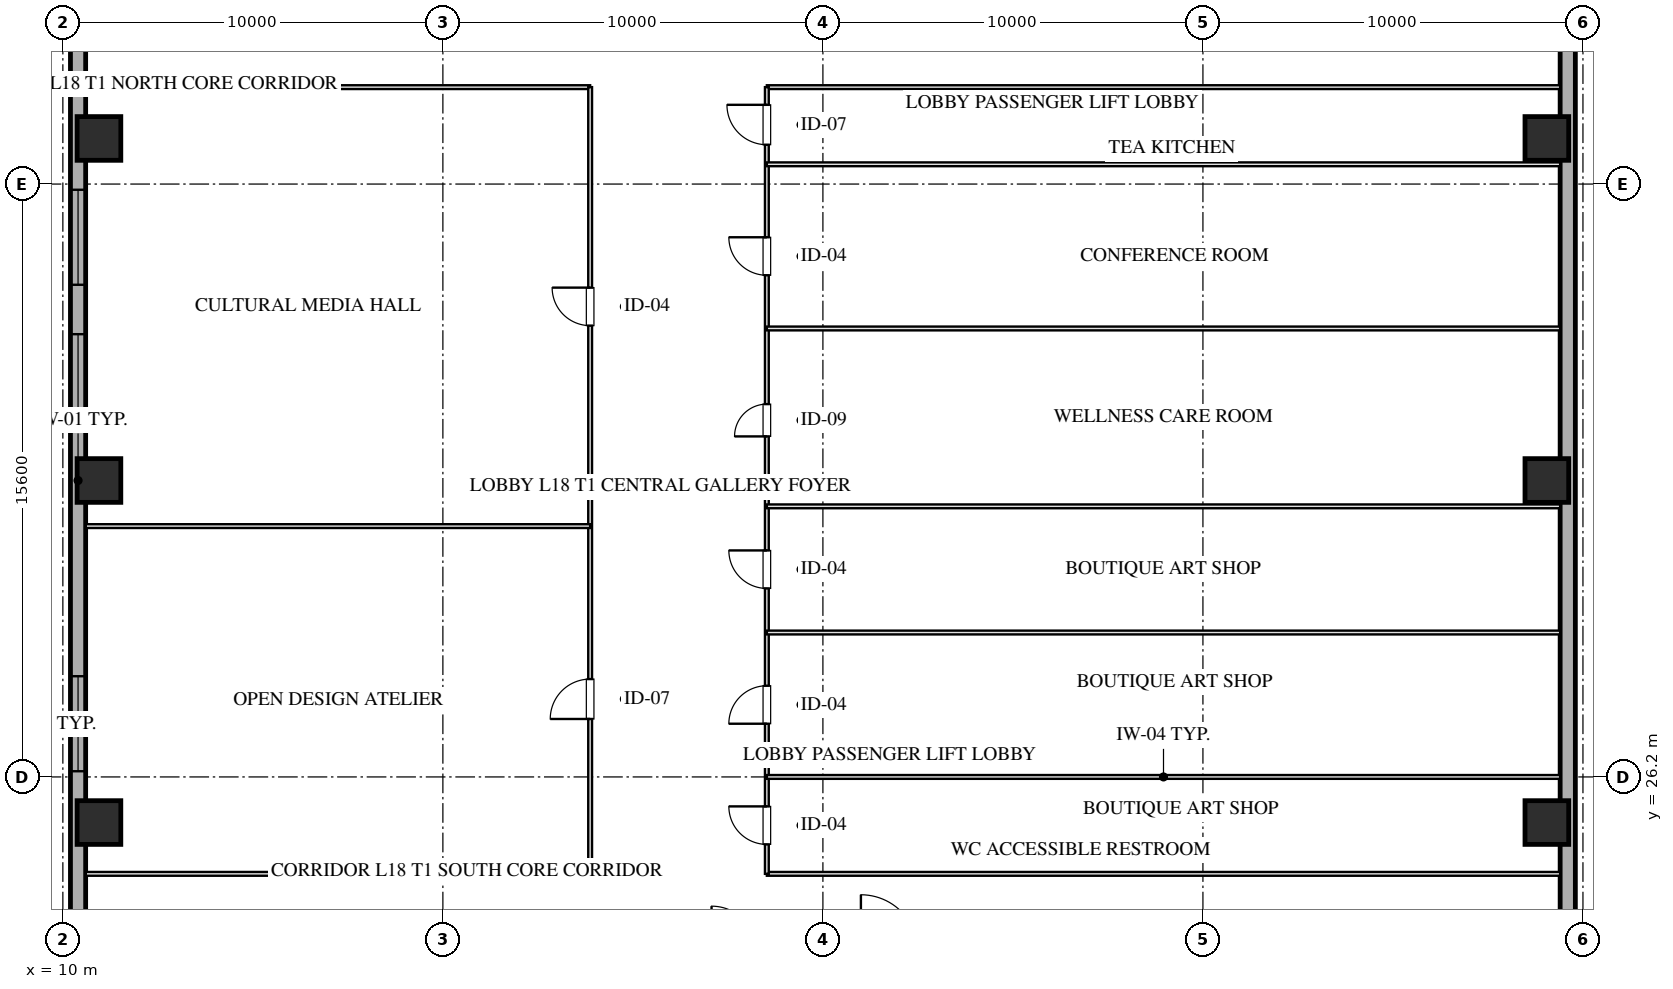
"""IFC4 building model, lengths in metres.
Left out: names, types, materials, properties, quantities, classifications, styles, units other than length and angle.
Written with IfcOpenShell. Run it as: python <this file> out.ifc"""

import sys

from ifc_helpers import new_model, si_unit, direction, frame, frame_2d, origin, origin_2d, place, context, subcontext, project, spatial, rectangle, hollow_rectangle, extrude, element, fill, save


model = new_model("IFC4")
c1 = context("Model", 3, precision=1e-05, world=origin(), true_north=direction((0.0, 1.0)))
c2 = subcontext(c1, "Body", "Model", "MODEL_VIEW")
j1 = project(units=[si_unit("LENGTHUNIT", "METRE"), si_unit("PLANEANGLEUNIT", "RADIAN")], contexts=[c1])
p1 = place(None, origin())
s1 = spatial("IfcSite", under=j1, at=p1, CompositionType="ELEMENT")
p2 = place(p1, origin())
s2 = spatial("IfcBuilding", under=s1, at=p2, CompositionType="ELEMENT")
p3 = place(p2, frame((0.0, 0.0, 74.75)))
s3 = spatial("IfcBuildingStorey", under=s2, at=p3, CompositionType="ELEMENT", Elevation=74.75)
for number, where, z_axis, x_axis in (
    (1, (10.95, 25.0, 0.0), (0.0, 0.0, 1.0), (1.0, 0.0, 0.0)),
    (2, (10.95, 34.0, 0.0), (0.0, 0.0, 1.0), (1.0, 0.0, 0.0)),
    (3, (10.95, 43.0, 0.0), (0.0, 0.0, 1.0), (1.0, 0.0, 0.0)),
    (4, (49.05, 25.0, 0.0), (0.0, 0.0, 1.0), (1.0, 0.0, 0.0)),
    (5, (49.05, 34.0, 0.0), (0.0, 0.0, 1.0), (1.0, 0.0, 0.0)),
    (6, (49.05, 43.0, 0.0), (0.0, 0.0, 1.0), (1.0, 0.0, 0.0)),
):
    element("IfcColumn", number, at=place(p3, frame(where, z_axis=z_axis, x_axis=x_axis)), inside=s3, PredefinedType="COLUMN", context=c2, shape_type="SweptSolid", body=[
        extrude(hollow_rectangle(XDim=1.15, YDim=1.15, WallThickness=0.04, at=origin_2d()), origin(), (0.0, 0.0, 1.0), 3.451),
    ])
p4 = place(p3, frame((10.4, 7.2, 0.0), z_axis=(0.0, 0.0, 1.0), x_axis=(0.0, 1.0, 0.0)))
e7 = element("IfcWall", 7, at=p4, inside=s3, PredefinedType="SOLIDWALL", context=c2, shape_type="SweptSolid", body=[
    extrude(rectangle(XDim=53.6, YDim=0.4, at=frame_2d((26.8, 0.0))), origin(), (0.0, 0.0, 1.0), 2.61),
])
p5 = place(p4, frame((19.15, 0.0, 0.75)))
e8 = element("IfcOpeningElement", 8, at=p5, cuts=e7, PredefinedType="OPENING", context=c2, shape_type="SweptSolid", body=[
    extrude(rectangle(XDim=2.5, YDim=1.46, at=frame_2d((1.25, 0.73))), frame((0.0, 0.21, 0.0), z_axis=(0.0, -1.0, 0.0), x_axis=(1.0, 0.0, 0.0)), (0.0, 0.0, 1.0), 0.42),
])
p6 = place(p4, frame((28.15, 0.0, 0.75)))
e9 = element("IfcOpeningElement", 9, at=p6, cuts=e7, PredefinedType="OPENING", context=c2, shape_type="SweptSolid", body=[
    extrude(rectangle(XDim=2.5, YDim=1.46, at=frame_2d((1.25, 0.73))), frame((0.0, 0.21, 0.0), z_axis=(0.0, -1.0, 0.0), x_axis=(1.0, 0.0, 0.0)), (0.0, 0.0, 1.0), 0.42),
])
p7 = place(p4, frame((31.95, 0.0, 0.75)))
e10 = element("IfcOpeningElement", 10, at=p7, cuts=e7, PredefinedType="OPENING", context=c2, shape_type="SweptSolid", body=[
    extrude(rectangle(XDim=2.5, YDim=1.46, at=frame_2d((1.25, 0.73))), frame((0.0, 0.21, 0.0), z_axis=(0.0, -1.0, 0.0), x_axis=(1.0, 0.0, 0.0)), (0.0, 0.0, 1.0), 0.42),
])
p8 = place(p3, frame((49.6, 60.8, 0.0), z_axis=(0.0, 0.0, 1.0), x_axis=(0.0, -1.0, 0.0)))
e11 = element("IfcWall", 11, at=p8, inside=s3, PredefinedType="SOLIDWALL", context=c2, shape_type="SweptSolid", body=[
    extrude(rectangle(XDim=53.6, YDim=0.4, at=frame_2d((26.8, 0.0))), origin(), (0.0, 0.0, 1.0), 2.61),
])
p9 = place(p3, frame((10.6, 23.65, 0.0), z_axis=(0.0, 0.0, 1.0), x_axis=(1.0, 0.0, 0.0)))
e12 = element("IfcWall", 12, at=p9, inside=s3, PredefinedType="MOVABLE", context=c2, shape_type="SweptSolid", body=[
    extrude(rectangle(XDim=13.275, YDim=0.1, at=frame_2d((6.637, 0.0))), origin(), (0.0, 0.0, 1.0), 3.175),
])
p10 = place(p3, frame((28.525, 23.65, 0.0), z_axis=(0.0, 0.0, 1.0), x_axis=(1.0, 0.0, 0.0)))
e13 = element("IfcWall", 13, at=p10, inside=s3, PredefinedType="MOVABLE", context=c2, shape_type="SweptSolid", body=[
    extrude(rectangle(XDim=20.875, YDim=0.1, at=frame_2d((10.438, 0.0))), origin(), (0.0, 0.0, 1.0), 3.175),
])
p11 = place(p3, frame((10.6, 44.35, 0.0), z_axis=(0.0, 0.0, 1.0), x_axis=(1.0, 0.0, 0.0)))
e14 = element("IfcWall", 14, at=p11, inside=s3, PredefinedType="MOVABLE", context=c2, shape_type="SweptSolid", body=[
    extrude(rectangle(XDim=13.275, YDim=0.1, at=frame_2d((6.637, 0.0))), origin(), (0.0, 0.0, 1.0), 3.175),
])
p12 = place(p3, frame((28.525, 44.35, 0.0), z_axis=(0.0, 0.0, 1.0), x_axis=(1.0, 0.0, 0.0)))
e15 = element("IfcWall", 15, at=p12, inside=s3, PredefinedType="MOVABLE", context=c2, shape_type="SweptSolid", body=[
    extrude(rectangle(XDim=20.875, YDim=0.1, at=frame_2d((10.438, 0.0))), origin(), (0.0, 0.0, 1.0), 3.175),
])
p13 = place(p3, frame((23.875, 23.65, 0.0), z_axis=(0.0, 0.0, 1.0), x_axis=(0.0, 1.0, 0.0)))
e16 = element("IfcWall", 16, at=p13, inside=s3, PredefinedType="MOVABLE", context=c2, shape_type="SweptSolid", body=[
    extrude(rectangle(XDim=20.7, YDim=0.1, at=frame_2d((10.35, 0.0))), origin(), (0.0, 0.0, 1.0), 3.175),
])
p14 = place(p13, frame((4.075, 0.0, 0.0)))
e17 = element("IfcOpeningElement", 17, at=p14, cuts=e16, PredefinedType="OPENING", context=c2, shape_type="SweptSolid", body=[
    extrude(rectangle(XDim=1.05, YDim=2.05, at=frame_2d((0.525, 1.025))), frame((0.0, 0.06, 0.0), z_axis=(0.0, -1.0, 0.0), x_axis=(1.0, 0.0, 0.0)), (0.0, 0.0, 1.0), 0.12),
])
p15 = place(p13, frame((14.425, 0.0, 0.0)))
e18 = element("IfcOpeningElement", 18, at=p15, cuts=e16, PredefinedType="OPENING", context=c2, shape_type="SweptSolid", body=[
    extrude(rectangle(XDim=1.0, YDim=2.05, at=frame_2d((0.5, 1.025))), frame((0.0, 0.06, 0.0), z_axis=(0.0, -1.0, 0.0), x_axis=(1.0, 0.0, 0.0)), (0.0, 0.0, 1.0), 0.12),
])
p16 = place(p3, frame((28.525, 23.65, 0.0), z_axis=(0.0, 0.0, 1.0), x_axis=(0.0, 1.0, 0.0)))
e19 = element("IfcWall", 19, at=p16, inside=s3, PredefinedType="MOVABLE", context=c2, shape_type="SweptSolid", body=[
    extrude(rectangle(XDim=20.7, YDim=0.1, at=frame_2d((10.35, 0.0))), origin(), (0.0, 0.0, 1.0), 3.175),
])
p17 = place(p16, frame((0.775, 0.0, 0.0)))
e20 = element("IfcOpeningElement", 20, at=p17, cuts=e19, PredefinedType="OPENING", context=c2, shape_type="SweptSolid", body=[
    extrude(rectangle(XDim=1.0, YDim=2.05, at=frame_2d((0.5, 1.025))), frame((0.0, 0.06, 0.0), z_axis=(0.0, -1.0, 0.0), x_axis=(1.0, 0.0, 0.0)), (0.0, 0.0, 1.0), 0.12),
])
p18 = place(p16, frame((3.95, 0.0, 0.0)))
e21 = element("IfcOpeningElement", 21, at=p18, cuts=e19, PredefinedType="OPENING", context=c2, shape_type="SweptSolid", body=[
    extrude(rectangle(XDim=1.0, YDim=2.05, at=frame_2d((0.5, 1.025))), frame((0.0, 0.06, 0.0), z_axis=(0.0, -1.0, 0.0), x_axis=(1.0, 0.0, 0.0)), (0.0, 0.0, 1.0), 0.12),
])
p19 = place(p16, frame((7.51, 0.0, 0.0)))
e22 = element("IfcOpeningElement", 22, at=p19, cuts=e19, PredefinedType="OPENING", context=c2, shape_type="SweptSolid", body=[
    extrude(rectangle(XDim=1.0, YDim=2.05, at=frame_2d((0.5, 1.025))), frame((0.0, 0.06, 0.0), z_axis=(0.0, -1.0, 0.0), x_axis=(1.0, 0.0, 0.0)), (0.0, 0.0, 1.0), 0.12),
])
p20 = place(p16, frame((11.51, 0.0, 0.0)))
e23 = element("IfcOpeningElement", 23, at=p20, cuts=e19, PredefinedType="OPENING", context=c2, shape_type="SweptSolid", body=[
    extrude(rectangle(XDim=0.85, YDim=2.05, at=frame_2d((0.425, 1.025))), frame((0.0, 0.06, 0.0), z_axis=(0.0, -1.0, 0.0), x_axis=(1.0, 0.0, 0.0)), (0.0, 0.0, 1.0), 0.12),
])
p21 = place(p16, frame((15.75, 0.0, 0.0)))
e24 = element("IfcOpeningElement", 24, at=p21, cuts=e19, PredefinedType="OPENING", context=c2, shape_type="SweptSolid", body=[
    extrude(rectangle(XDim=1.0, YDim=2.05, at=frame_2d((0.5, 1.025))), frame((0.0, 0.06, 0.0), z_axis=(0.0, -1.0, 0.0), x_axis=(1.0, 0.0, 0.0)), (0.0, 0.0, 1.0), 0.12),
])
p22 = place(p16, frame((19.185, 0.0, 0.0)))
e25 = element("IfcOpeningElement", 25, at=p22, cuts=e19, PredefinedType="OPENING", context=c2, shape_type="SweptSolid", body=[
    extrude(rectangle(XDim=1.05, YDim=2.05, at=frame_2d((0.525, 1.025))), frame((0.0, 0.06, 0.0), z_axis=(0.0, -1.0, 0.0), x_axis=(1.0, 0.0, 0.0)), (0.0, 0.0, 1.0), 0.12),
])
p23 = place(p3, frame((10.6, 32.8, 0.0), z_axis=(0.0, 0.0, 1.0), x_axis=(1.0, 0.0, 0.0)))
e26 = element("IfcWall", 26, at=p23, inside=s3, PredefinedType="MOVABLE", context=c2, shape_type="SweptSolid", body=[
    extrude(rectangle(XDim=13.275, YDim=0.1, at=frame_2d((6.637, 0.0))), origin(), (0.0, 0.0, 1.0), 3.175),
])
for number, where, z_axis, x_axis in (
    (27, (28.525, 26.2, 0.0), (0.0, 0.0, 1.0), (1.0, 0.0, 0.0)),
    (28, (28.525, 30.0, 0.0), (0.0, 0.0, 1.0), (1.0, 0.0, 0.0)),
    (29, (28.525, 33.32, 0.0), (0.0, 0.0, 1.0), (1.0, 0.0, 0.0)),
    (30, (28.525, 38.0, 0.0), (0.0, 0.0, 1.0), (1.0, 0.0, 0.0)),
    (31, (28.525, 42.32, 0.0), (0.0, 0.0, 1.0), (1.0, 0.0, 0.0)),
):
    element("IfcWall", number, at=place(p3, frame(where, z_axis=z_axis, x_axis=x_axis)), inside=s3, PredefinedType="MOVABLE", context=c2, shape_type="SweptSolid", body=[
        extrude(rectangle(XDim=20.875, YDim=0.1, at=frame_2d((10.438, 0.0))), origin(), (0.0, 0.0, 1.0), 3.175),
    ])
p24 = place(p5, origin())
e32 = element("IfcWindow", 32, at=p24, inside=s3, PartitioningType="TRIPLE_PANEL_VERTICAL", PredefinedType="WINDOW", context=c2, shape_type="SweptSolid", body=[
    extrude(rectangle(XDim=2.5, YDim=1.46, at=frame_2d((1.25, 0.73))), frame((0.0, 0.03, 0.0), z_axis=(0.0, -1.0, 0.0), x_axis=(1.0, 0.0, 0.0)), (0.0, 0.0, 1.0), 0.06),
])
fill(e8, e32)
p25 = place(p6, origin())
e33 = element("IfcWindow", 33, at=p25, inside=s3, PartitioningType="TRIPLE_PANEL_VERTICAL", PredefinedType="WINDOW", context=c2, shape_type="SweptSolid", body=[
    extrude(rectangle(XDim=2.5, YDim=1.46, at=frame_2d((1.25, 0.73))), frame((0.0, 0.03, 0.0), z_axis=(0.0, -1.0, 0.0), x_axis=(1.0, 0.0, 0.0)), (0.0, 0.0, 1.0), 0.06),
])
fill(e9, e33)
p26 = place(p7, origin())
e34 = element("IfcWindow", 34, at=p26, inside=s3, PartitioningType="TRIPLE_PANEL_VERTICAL", PredefinedType="WINDOW", context=c2, shape_type="SweptSolid", body=[
    extrude(rectangle(XDim=2.5, YDim=1.46, at=frame_2d((1.25, 0.73))), frame((0.0, 0.03, 0.0), z_axis=(0.0, -1.0, 0.0), x_axis=(1.0, 0.0, 0.0)), (0.0, 0.0, 1.0), 0.06),
])
fill(e10, e34)
p27 = place(p14, origin())
e35 = element("IfcDoor", 35, at=p27, inside=s3, OperationType="SINGLE_SWING_LEFT", PredefinedType="DOOR", context=c2, shape_type="SweptSolid", body=[
    extrude(rectangle(XDim=1.05, YDim=2.05, at=frame_2d((0.525, 1.025))), frame((0.0, 0.025, 0.0), z_axis=(0.0, -1.0, 0.0), x_axis=(1.0, 0.0, 0.0)), (0.0, 0.0, 1.0), 0.05),
])
fill(e17, e35)
p28 = place(p15, origin())
e36 = element("IfcDoor", 36, at=p28, inside=s3, OperationType="SINGLE_SWING_RIGHT", PredefinedType="DOOR", context=c2, shape_type="SweptSolid", body=[
    extrude(rectangle(XDim=1.0, YDim=2.05, at=frame_2d((0.5, 1.025))), frame((0.0, 0.025, 0.0), z_axis=(0.0, -1.0, 0.0), x_axis=(1.0, 0.0, 0.0)), (0.0, 0.0, 1.0), 0.05),
])
fill(e18, e36)
p29 = place(p17, origin())
e37 = element("IfcDoor", 37, at=p29, inside=s3, OperationType="SINGLE_SWING_RIGHT", PredefinedType="DOOR", context=c2, shape_type="SweptSolid", body=[
    extrude(rectangle(XDim=1.0, YDim=2.05, at=frame_2d((0.5, 1.025))), frame((0.0, 0.025, 0.0), z_axis=(0.0, -1.0, 0.0), x_axis=(1.0, 0.0, 0.0)), (0.0, 0.0, 1.0), 0.05),
])
fill(e20, e37)
p30 = place(p18, origin())
e38 = element("IfcDoor", 38, at=p30, inside=s3, OperationType="SINGLE_SWING_LEFT", PredefinedType="DOOR", context=c2, shape_type="SweptSolid", body=[
    extrude(rectangle(XDim=1.0, YDim=2.05, at=frame_2d((0.5, 1.025))), frame((0.0, 0.025, 0.0), z_axis=(0.0, -1.0, 0.0), x_axis=(1.0, 0.0, 0.0)), (0.0, 0.0, 1.0), 0.05),
])
fill(e21, e38)
p31 = place(p19, origin())
e39 = element("IfcDoor", 39, at=p31, inside=s3, OperationType="SINGLE_SWING_RIGHT", PredefinedType="DOOR", context=c2, shape_type="SweptSolid", body=[
    extrude(rectangle(XDim=1.0, YDim=2.05, at=frame_2d((0.5, 1.025))), frame((0.0, 0.025, 0.0), z_axis=(0.0, -1.0, 0.0), x_axis=(1.0, 0.0, 0.0)), (0.0, 0.0, 1.0), 0.05),
])
fill(e22, e39)
p32 = place(p20, origin())
e40 = element("IfcDoor", 40, at=p32, inside=s3, OperationType="SINGLE_SWING_LEFT", PredefinedType="DOOR", context=c2, shape_type="SweptSolid", body=[
    extrude(rectangle(XDim=0.85, YDim=2.05, at=frame_2d((0.425, 1.025))), frame((0.0, 0.025, 0.0), z_axis=(0.0, -1.0, 0.0), x_axis=(1.0, 0.0, 0.0)), (0.0, 0.0, 1.0), 0.05),
])
fill(e23, e40)
p33 = place(p21, origin())
e41 = element("IfcDoor", 41, at=p33, inside=s3, OperationType="SINGLE_SWING_RIGHT", PredefinedType="DOOR", context=c2, shape_type="SweptSolid", body=[
    extrude(rectangle(XDim=1.0, YDim=2.05, at=frame_2d((0.5, 1.025))), frame((0.0, 0.025, 0.0), z_axis=(0.0, -1.0, 0.0), x_axis=(1.0, 0.0, 0.0)), (0.0, 0.0, 1.0), 0.05),
])
fill(e24, e41)
p34 = place(p22, origin())
e42 = element("IfcDoor", 42, at=p34, inside=s3, OperationType="SINGLE_SWING_RIGHT", PredefinedType="DOOR", context=c2, shape_type="SweptSolid", body=[
    extrude(rectangle(XDim=1.05, YDim=2.05, at=frame_2d((0.525, 1.025))), frame((0.0, 0.025, 0.0), z_axis=(0.0, -1.0, 0.0), x_axis=(1.0, 0.0, 0.0)), (0.0, 0.0, 1.0), 0.05),
])
fill(e25, e42)
save(model, sys.argv[1])
